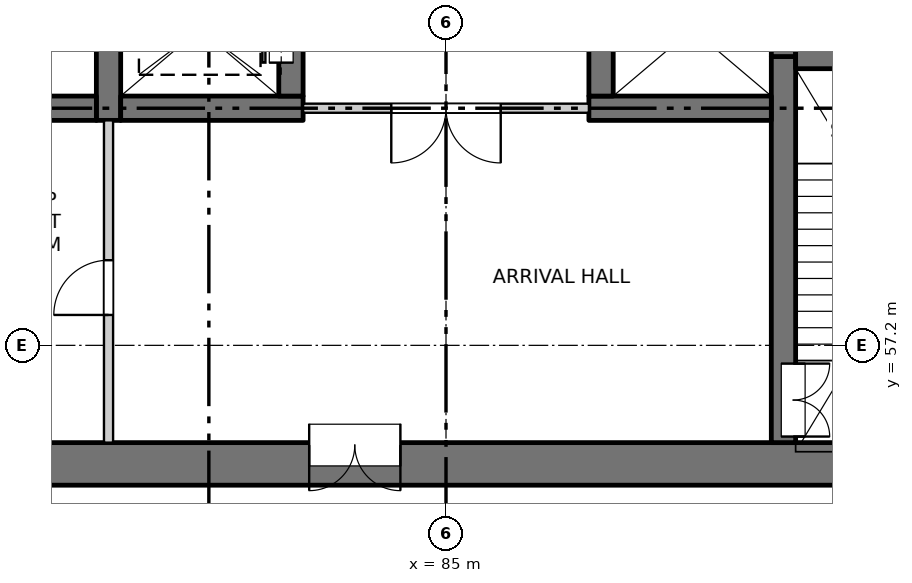
"""IFC4 building model, lengths in metres.
Left out: names, types, materials, properties, quantities, classifications, styles, units other than length and angle.
Written with IfcOpenShell. Run it as: python <this file> out.ifc"""

import sys

from ifc_helpers import new_model, si_unit, direction, frame, frame_2d, origin, place, context, subcontext, project, spatial, rectangle, extrude, element, fill, save


model = new_model("IFC4")
c1 = context("Model", 3, precision=1e-05, world=origin(), true_north=direction((0.0, 1.0)))
c2 = subcontext(c1, "Body", "Model", "MODEL_VIEW")
j1 = project(units=[si_unit("LENGTHUNIT", "METRE"), si_unit("PLANEANGLEUNIT", "RADIAN")], contexts=[c1])
p1 = place(None, origin())
s1 = spatial("IfcSite", under=j1, at=p1, CompositionType="ELEMENT")
p2 = place(p1, origin())
s2 = spatial("IfcBuilding", under=s1, at=p2, CompositionType="ELEMENT")
p3 = place(p2, frame((0.0, 0.0, 46.7)))
s3 = spatial("IfcBuildingStorey", under=s2, at=p3, CompositionType="ELEMENT", Elevation=46.7)
p4 = place(p3, frame((75.6, 55.25, -0.3), z_axis=(0.0, 0.0, 1.0), x_axis=(1.0, 0.0, 0.0)))
e1 = element("IfcWall", 1, at=p4, inside=s3, PredefinedType="SOLIDWALL", context=c2, shape_type="SweptSolid", body=[
    extrude(rectangle(XDim=18.8, YDim=0.7, at=frame_2d((9.4, 0.0))), origin(), (0.0, 0.0, 1.0), 4.5),
])
p5 = place(p4, frame((7.15, 0.0, 0.3)))
e2 = element("IfcOpeningElement", 2, at=p5, cuts=e1, PredefinedType="OPENING", context=c2, shape_type="SweptSolid", body=[
    extrude(rectangle(XDim=1.5, YDim=2.1, at=frame_2d((0.75, 1.05))), frame((0.0, 0.36, 0.0), z_axis=(0.0, -1.0, 0.0), x_axis=(1.0, 0.0, 0.0)), (0.0, 0.0, 1.0), 0.72),
])
p6 = place(p3, frame((79.45, 60.9, -0.3), z_axis=(0.0, 0.0, 1.0), x_axis=(0.0, 1.0, 0.0)))
e3 = element("IfcWall", 3, at=p6, inside=s3, PredefinedType="SOLIDWALL", context=c2, shape_type="SweptSolid", body=[
    extrude(rectangle(XDim=16.4, YDim=0.4, at=frame_2d((8.2, 0.0))), origin(), (0.0, 0.0, 1.0), 4.5),
])
p7 = place(p3, frame((90.55, 55.6, -0.3), z_axis=(0.0, 0.0, 1.0), x_axis=(0.0, 1.0, 0.0)))
e4 = element("IfcWall", 4, at=p7, inside=s3, PredefinedType="SOLIDWALL", context=c2, shape_type="SweptSolid", body=[
    extrude(rectangle(XDim=6.35, YDim=0.4, at=frame_2d((3.175, 0.0))), origin(), (0.0, 0.0, 1.0), 4.5),
])
p8 = place(p7, frame((0.1, 0.0, 0.3)))
e5 = element("IfcOpeningElement", 5, at=p8, cuts=e4, PredefinedType="OPENING", context=c2, shape_type="SweptSolid", body=[
    extrude(rectangle(XDim=1.2, YDim=2.1, at=frame_2d((0.6, 1.05))), frame((0.0, 0.21, 0.0), z_axis=(0.0, -1.0, 0.0), x_axis=(1.0, 0.0, 0.0)), (0.0, 0.0, 1.0), 0.42),
])
p9 = place(p3, frame((90.55, 61.95, -0.3), z_axis=(0.0, 0.0, 1.0), x_axis=(0.0, 1.0, 0.0)))
e6 = element("IfcWall", 6, at=p9, inside=s3, PredefinedType="SOLIDWALL", context=c2, shape_type="SweptSolid", body=[
    extrude(rectangle(XDim=15.35, YDim=0.4, at=frame_2d((7.675, 0.0))), origin(), (0.0, 0.0, 1.0), 4.5),
])
p10 = place(p3, frame((79.65, 61.1, -0.3), z_axis=(0.0, 0.0, 1.0), x_axis=(1.0, 0.0, 0.0)))
e7 = element("IfcWall", 7, at=p10, inside=s3, PredefinedType="SOLIDWALL", context=c2, shape_type="SweptSolid", body=[
    extrude(rectangle(XDim=3.0, YDim=0.4, at=frame_2d((1.5, 0.0))), origin(), (0.0, 0.0, 1.0), 4.5),
])
p11 = place(p3, frame((82.45, 61.3, -0.3), z_axis=(0.0, 0.0, 1.0), x_axis=(0.0, 1.0, 0.0)))
e8 = element("IfcWall", 8, at=p11, inside=s3, PredefinedType="SOLIDWALL", context=c2, shape_type="SweptSolid", body=[
    extrude(rectangle(XDim=2.2, YDim=0.4, at=frame_2d((1.1, 0.0))), origin(), (0.0, 0.0, 1.0), 4.5),
])
p12 = place(p11, frame((0.55, 0.0, 0.3)))
e9 = element("IfcOpeningElement", 9, at=p12, cuts=e8, PredefinedType="OPENING", context=c2, shape_type="SweptSolid", body=[
    extrude(rectangle(XDim=1.1, YDim=2.1, at=frame_2d((0.55, 1.05))), frame((0.0, 0.21, 0.0), z_axis=(0.0, -1.0, 0.0), x_axis=(1.0, 0.0, 0.0)), (0.0, 0.0, 1.0), 0.42),
])
p13 = place(p3, frame((87.35, 61.1, -0.3), z_axis=(0.0, 0.0, 1.0), x_axis=(1.0, 0.0, 0.0)))
e10 = element("IfcWall", 10, at=p13, inside=s3, PredefinedType="SOLIDWALL", context=c2, shape_type="SweptSolid", body=[
    extrude(rectangle(XDim=3.0, YDim=0.4, at=frame_2d((1.5, 0.0))), origin(), (0.0, 0.0, 1.0), 4.5),
])
p14 = place(p3, frame((87.55, 61.3, -0.3), z_axis=(0.0, 0.0, 1.0), x_axis=(0.0, 1.0, 0.0)))
e11 = element("IfcWall", 11, at=p14, inside=s3, PredefinedType="SOLIDWALL", context=c2, shape_type="SweptSolid", body=[
    extrude(rectangle(XDim=2.2, YDim=0.4, at=frame_2d((1.1, 0.0))), origin(), (0.0, 0.0, 1.0), 4.5),
])
for number, where, z_axis, x_axis in (
    (12, (75.6, 61.1, -0.3), (0.0, 0.0, 1.0), (1.0, 0.0, 0.0)),
    (13, (90.75, 61.95, -0.3), (0.0, 0.0, 1.0), (1.0, 0.0, 0.0)),
):
    element("IfcWall", number, at=place(p3, frame(where, z_axis=z_axis, x_axis=x_axis)), inside=s3, PredefinedType="SOLIDWALL", context=c2, shape_type="SweptSolid", body=[
        extrude(rectangle(XDim=3.65, YDim=0.4, at=frame_2d((1.825, 0.0))), origin(), (0.0, 0.0, 1.0), 4.5),
    ])
p15 = place(p3, frame((82.65, 61.1, 0.0), z_axis=(0.0, 0.0, 1.0), x_axis=(1.0, 0.0, 0.0)))
e14 = element("IfcWall", 14, at=p15, inside=s3, PredefinedType="PARTITIONING", context=c2, shape_type="SweptSolid", body=[
    extrude(rectangle(XDim=4.7, YDim=0.15, at=frame_2d((2.35, 0.0))), origin(), (0.0, 0.0, 1.0), 4.2),
])
p16 = place(p15, frame((1.45, 0.0, 0.0)))
e15 = element("IfcOpeningElement", 15, at=p16, cuts=e14, PredefinedType="OPENING", context=c2, shape_type="SweptSolid", body=[
    extrude(rectangle(XDim=1.8, YDim=2.1, at=frame_2d((0.9, 1.05))), frame((0.0, 0.085, 0.0), z_axis=(0.0, -1.0, 0.0), x_axis=(1.0, 0.0, 0.0)), (0.0, 0.0, 1.0), 0.17),
])
p17 = place(p3, frame((79.45, 55.6, 0.0), z_axis=(0.0, 0.0, 1.0), x_axis=(0.0, 1.0, 0.0)))
e16 = element("IfcWall", 16, at=p17, inside=s3, PredefinedType="PARTITIONING", context=c2, shape_type="SweptSolid", body=[
    extrude(rectangle(XDim=5.3, YDim=0.15, at=frame_2d((2.65, 0.0))), origin(), (0.0, 0.0, 1.0), 4.2),
])
p18 = place(p17, frame((2.1, 0.0, 0.0)))
e17 = element("IfcOpeningElement", 17, at=p18, cuts=e16, PredefinedType="OPENING", context=c2, shape_type="SweptSolid", body=[
    extrude(rectangle(XDim=0.9, YDim=2.1, at=frame_2d((0.45, 1.05))), frame((0.0, 0.085, 0.0), z_axis=(0.0, -1.0, 0.0), x_axis=(1.0, 0.0, 0.0)), (0.0, 0.0, 1.0), 0.17),
])
p19 = place(p5, origin())
e18 = element("IfcDoor", 18, at=p19, inside=s3, OperationType="DOUBLE_DOOR_SINGLE_SWING", PredefinedType="DOOR", context=c2, shape_type="SweptSolid", body=[
    extrude(rectangle(XDim=1.5, YDim=2.1, at=frame_2d((0.75, 1.05))), frame((0.0, 0.335, 0.0), z_axis=(0.0, -1.0, 0.0), x_axis=(1.0, 0.0, 0.0)), (0.0, 0.0, 1.0), 0.05),
])
fill(e2, e18)
p20 = place(p8, origin())
e19 = element("IfcDoor", 19, at=p20, inside=s3, OperationType="DOUBLE_DOOR_SINGLE_SWING", PredefinedType="DOOR", context=c2, shape_type="SweptSolid", body=[
    extrude(rectangle(XDim=1.2, YDim=2.1, at=frame_2d((0.6, 1.05))), frame((0.0, -0.135, 0.0), z_axis=(0.0, -1.0, 0.0), x_axis=(1.0, 0.0, 0.0)), (0.0, 0.0, 1.0), 0.05),
])
fill(e5, e19)
p21 = place(p18, origin())
e20 = element("IfcDoor", 20, at=p21, inside=s3, OperationType="SINGLE_SWING_LEFT", PredefinedType="DOOR", context=c2, shape_type="SweptSolid", body=[
    extrude(rectangle(XDim=0.9, YDim=2.1, at=frame_2d((0.45, 1.05))), frame((0.0, 0.025, 0.0), z_axis=(0.0, -1.0, 0.0), x_axis=(1.0, 0.0, 0.0)), (0.0, 0.0, 1.0), 0.05),
])
fill(e17, e20)
p22 = place(p16, origin())
e21 = element("IfcDoor", 21, at=p22, inside=s3, OperationType="DOUBLE_DOOR_SINGLE_SWING", PredefinedType="DOOR", context=c2, shape_type="SweptSolid", body=[
    extrude(rectangle(XDim=1.8, YDim=2.1, at=frame_2d((0.9, 1.05))), frame((0.0, 0.025, 0.0), z_axis=(0.0, -1.0, 0.0), x_axis=(1.0, 0.0, 0.0)), (0.0, 0.0, 1.0), 0.05),
])
fill(e15, e21)
p23 = place(p12, origin())
e22 = element("IfcDoor", 22, at=p23, inside=s3, OperationType="SLIDING_TO_RIGHT", PredefinedType="DOOR", context=c2, shape_type="SweptSolid", body=[
    extrude(rectangle(XDim=1.1, YDim=2.1, at=frame_2d((0.55, 1.05))), frame((0.0, 0.185, 0.0), z_axis=(0.0, -1.0, 0.0), x_axis=(1.0, 0.0, 0.0)), (0.0, 0.0, 1.0), 0.05),
])
fill(e9, e22)
save(model, sys.argv[1])
